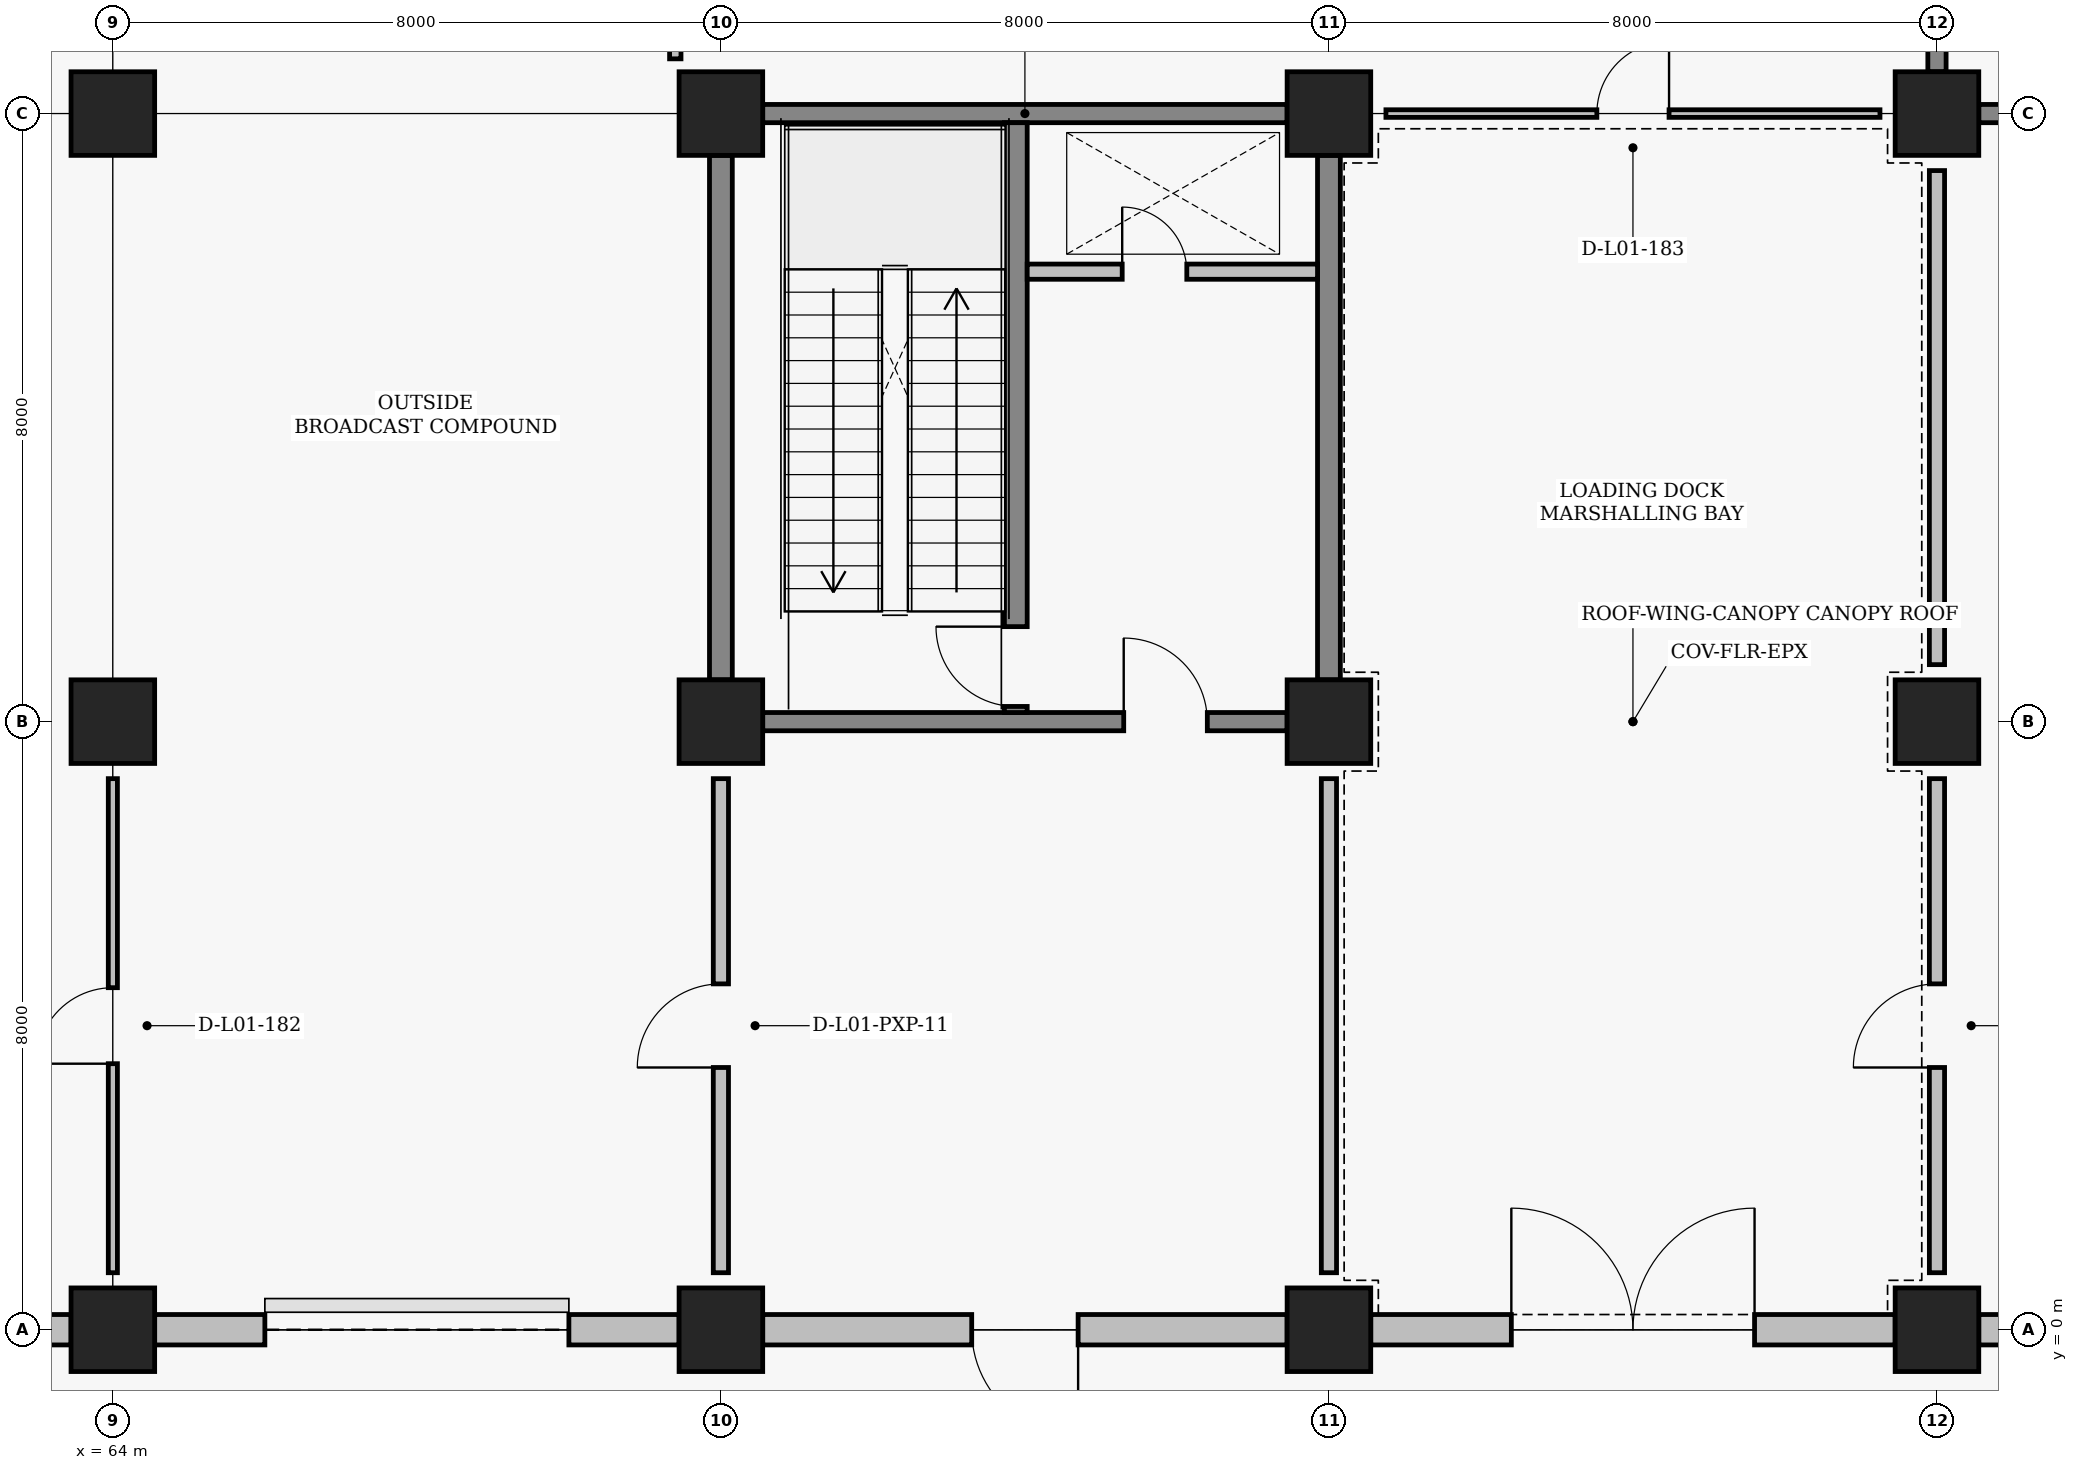
"""IFC4 building model, lengths in metres.
Left out: names, types, materials, properties, quantities, classifications, styles, units other than length and angle.
Written with IfcOpenShell. Run it as: python <this file> out.ifc"""

import sys

from ifc_helpers import new_model, si_unit, direction, frame, frame_2d, origin, origin_2d, place, context, subcontext, project, spatial, rectangle, extrude, element, fill, save


model = new_model("IFC4")
c1 = context("Model", 3, precision=1e-05, world=origin(), true_north=direction((0.0, 1.0)))
c2 = subcontext(c1, "Body", "Model", "MODEL_VIEW")
j1 = project(units=[si_unit("LENGTHUNIT", "METRE"), si_unit("PLANEANGLEUNIT", "RADIAN")], contexts=[c1])
p1 = place(None, origin())
s1 = spatial("IfcSite", under=j1, at=p1, CompositionType="ELEMENT")
p2 = place(p1, origin())
s2 = spatial("IfcBuilding", under=s1, at=p2, CompositionType="ELEMENT")
p3 = place(p2, origin())
s3 = spatial("IfcBuildingStorey", under=s2, at=p3, CompositionType="ELEMENT", Elevation=0.0)
for number, where, z_axis, x_axis in (
    (1, (64.0, 0.0, 0.0), (0.0, 0.0, 1.0), (1.0, 0.0, 0.0)),
    (2, (64.0, 8.0, 0.0), (0.0, 0.0, 1.0), (1.0, 0.0, 0.0)),
    (3, (64.0, 16.0, 0.0), (0.0, 0.0, 1.0), (1.0, 0.0, 0.0)),
    (4, (72.0, 0.0, 0.0), (0.0, 0.0, 1.0), (1.0, 0.0, 0.0)),
    (5, (72.0, 8.0, 0.0), (0.0, 0.0, 1.0), (1.0, 0.0, 0.0)),
    (6, (72.0, 16.0, 0.0), (0.0, 0.0, 1.0), (1.0, 0.0, 0.0)),
    (7, (80.0, 0.0, 0.0), (0.0, 0.0, 1.0), (1.0, 0.0, 0.0)),
    (8, (80.0, 8.0, 0.0), (0.0, 0.0, 1.0), (1.0, 0.0, 0.0)),
    (9, (80.0, 16.0, 0.0), (0.0, 0.0, 1.0), (1.0, 0.0, 0.0)),
    (10, (88.0, 0.0, 0.0), (0.0, 0.0, 1.0), (1.0, 0.0, 0.0)),
    (11, (88.0, 8.0, 0.0), (0.0, 0.0, 1.0), (1.0, 0.0, 0.0)),
    (12, (88.0, 16.0, 0.0), (0.0, 0.0, 1.0), (1.0, 0.0, 0.0)),
):
    element("IfcColumn", number, at=place(p3, frame(where, z_axis=z_axis, x_axis=x_axis)), inside=s3, PredefinedType="COLUMN", context=c2, shape_type="SweptSolid", body=[
        extrude(rectangle(XDim=1.1, YDim=1.1, at=origin_2d()), origin(), (0.0, 0.0, 1.0), 4.8),
    ])
p4 = place(p3, frame((56.55, 0.0, 0.0), z_axis=(0.0, 0.0, 1.0), x_axis=(1.0, 0.0, 0.0)))
e13 = element("IfcWall", 13, at=p4, inside=s3, PredefinedType="SOLIDWALL", context=c2, shape_type="SweptSolid", body=[
    extrude(rectangle(XDim=6.9, YDim=0.4, at=frame_2d((3.45, 0.0))), origin(), (0.0, 0.0, 1.0), 3.81),
])
p5 = place(p4, frame((2.05, 0.0, 0.0)))
e14 = element("IfcOpeningElement", 14, at=p5, cuts=e13, PredefinedType="OPENING", context=c2, shape_type="SweptSolid", body=[
    extrude(rectangle(XDim=2.8, YDim=2.55, at=frame_2d((1.4, 1.275))), frame((0.0, 0.21, 0.0), z_axis=(0.0, -1.0, 0.0), x_axis=(1.0, 0.0, 0.0)), (0.0, 0.0, 1.0), 0.42),
])
p6 = place(p3, frame((64.55, 0.0, 0.0), z_axis=(0.0, 0.0, 1.0), x_axis=(1.0, 0.0, 0.0)))
e15 = element("IfcWall", 15, at=p6, inside=s3, PredefinedType="SOLIDWALL", context=c2, shape_type="SweptSolid", body=[
    extrude(rectangle(XDim=6.9, YDim=0.4, at=frame_2d((3.45, 0.0))), origin(), (0.0, 0.0, 1.0), 3.81),
])
p7 = place(p6, frame((1.45, 0.0, 0.0)))
e16 = element("IfcOpeningElement", 16, at=p7, cuts=e15, PredefinedType="OPENING", context=c2, shape_type="SweptSolid", body=[
    extrude(rectangle(XDim=4.0, YDim=3.5, at=frame_2d((2.0, 1.75))), frame((0.0, 0.21, 0.0), z_axis=(0.0, -1.0, 0.0), x_axis=(1.0, 0.0, 0.0)), (0.0, 0.0, 1.0), 0.42),
])
p8 = place(p3, frame((79.45, 0.0, 0.0), z_axis=(0.0, 0.0, 1.0), x_axis=(-1.0, 0.0, 0.0)))
e17 = element("IfcWall", 17, at=p8, inside=s3, PredefinedType="SOLIDWALL", context=c2, shape_type="SweptSolid", body=[
    extrude(rectangle(XDim=6.9, YDim=0.4, at=frame_2d((3.45, 0.0))), origin(), (0.0, 0.0, 1.0), 3.81),
])
p9 = place(p8, frame((2.75, 0.0, 0.0)))
e18 = element("IfcOpeningElement", 18, at=p9, cuts=e17, PredefinedType="OPENING", context=c2, shape_type="SweptSolid", body=[
    extrude(rectangle(XDim=1.4, YDim=2.2, at=frame_2d((0.7, 1.1))), frame((0.0, 0.21, 0.0), z_axis=(0.0, -1.0, 0.0), x_axis=(1.0, 0.0, 0.0)), (0.0, 0.0, 1.0), 0.42),
])
p10 = place(p3, frame((80.55, 0.0, 0.0), z_axis=(0.0, 0.0, 1.0), x_axis=(1.0, 0.0, 0.0)))
e19 = element("IfcWall", 19, at=p10, inside=s3, PredefinedType="SOLIDWALL", context=c2, shape_type="SweptSolid", body=[
    extrude(rectangle(XDim=6.9, YDim=0.4, at=frame_2d((3.45, 0.0))), origin(), (0.0, 0.0, 1.0), 3.81),
])
p11 = place(p10, frame((1.85, 0.0, 0.0)))
e20 = element("IfcOpeningElement", 20, at=p11, cuts=e19, PredefinedType="OPENING", context=c2, shape_type="SweptSolid", body=[
    extrude(rectangle(XDim=3.2, YDim=2.7, at=frame_2d((1.6, 1.35))), frame((0.0, 0.21, 0.0), z_axis=(0.0, -1.0, 0.0), x_axis=(1.0, 0.0, 0.0)), (0.0, 0.0, 1.0), 0.42),
])
p12 = place(p3, frame((95.45, 0.0, 0.0), z_axis=(0.0, 0.0, 1.0), x_axis=(-1.0, 0.0, 0.0)))
e21 = element("IfcWall", 21, at=p12, inside=s3, PredefinedType="SOLIDWALL", context=c2, shape_type="SweptSolid", body=[
    extrude(rectangle(XDim=6.9, YDim=0.4, at=frame_2d((3.45, 0.0))), origin(), (0.0, 0.0, 1.0), 3.81),
])
p13 = place(p12, frame((2.75, 0.0, 0.0)))
e22 = element("IfcOpeningElement", 22, at=p13, cuts=e21, PredefinedType="OPENING", context=c2, shape_type="SweptSolid", body=[
    extrude(rectangle(XDim=1.4, YDim=2.2, at=frame_2d((0.7, 1.1))), frame((0.0, 0.21, 0.0), z_axis=(0.0, -1.0, 0.0), x_axis=(1.0, 0.0, 0.0)), (0.0, 0.0, 1.0), 0.42),
])
p14 = place(p3, frame((88.55, 16.0, 0.0), z_axis=(0.0, 0.0, 1.0), x_axis=(1.0, 0.0, 0.0)))
e23 = element("IfcWall", 23, at=p14, inside=s3, PredefinedType="SHEAR", context=c2, shape_type="SweptSolid", body=[
    extrude(rectangle(XDim=6.9, YDim=0.24, at=frame_2d((3.45, 0.0))), origin(), (0.0, 0.0, 1.0), 2.34),
])
p15 = place(p14, frame((4.75, 0.0, 0.0)))
e24 = element("IfcOpeningElement", 24, at=p15, cuts=e23, PredefinedType="OPENING", context=c2, shape_type="SweptSolid", body=[
    extrude(rectangle(XDim=1.1, YDim=2.2, at=frame_2d((0.55, 1.1))), frame((0.0, 0.13, 0.0), z_axis=(0.0, -1.0, 0.0), x_axis=(1.0, 0.0, 0.0)), (0.0, 0.0, 1.0), 0.26),
])
p16 = place(p3, frame((88.0, 16.55, 0.0), z_axis=(0.0, 0.0, 1.0), x_axis=(0.0, 1.0, 0.0)))
e25 = element("IfcWall", 25, at=p16, inside=s3, PredefinedType="SHEAR", context=c2, shape_type="SweptSolid", body=[
    extrude(rectangle(XDim=6.9, YDim=0.24, at=frame_2d((3.45, 0.0))), origin(), (0.0, 0.0, 1.0), 2.34),
])
p17 = place(p3, frame((72.55, 8.0, 0.0), z_axis=(0.0, 0.0, 1.0), x_axis=(1.0, 0.0, 0.0)))
e26 = element("IfcWall", 26, at=p17, inside=s3, PredefinedType="SHEAR", context=c2, shape_type="SweptSolid", body=[
    extrude(rectangle(XDim=6.9, YDim=0.24, at=frame_2d((3.45, 0.0))), origin(), (0.0, 0.0, 1.0), 3.81),
])
p18 = place(p17, frame((4.75, 0.0, 0.0)))
e27 = element("IfcOpeningElement", 27, at=p18, cuts=e26, PredefinedType="OPENING", context=c2, shape_type="SweptSolid", body=[
    extrude(rectangle(XDim=1.1, YDim=2.2, at=frame_2d((0.55, 1.1))), frame((0.0, 0.13, 0.0), z_axis=(0.0, -1.0, 0.0), x_axis=(1.0, 0.0, 0.0)), (0.0, 0.0, 1.0), 0.26),
])
p19 = place(p3, frame((72.55, 16.0, 0.0), z_axis=(0.0, 0.0, 1.0), x_axis=(1.0, 0.0, 0.0)))
e28 = element("IfcWall", 28, at=p19, inside=s3, PredefinedType="SHEAR", context=c2, shape_type="SweptSolid", body=[
    extrude(rectangle(XDim=6.9, YDim=0.24, at=frame_2d((3.45, 0.0))), origin(), (0.0, 0.0, 1.0), 2.34),
])
for number, where, z_axis, x_axis in (
    (29, (72.0, 8.55, 0.0), (0.0, 0.0, 1.0), (0.0, 1.0, 0.0)),
    (30, (80.0, 8.55, 0.0), (0.0, 0.0, 1.0), (0.0, 1.0, 0.0)),
):
    element("IfcWall", number, at=place(p3, frame(where, z_axis=z_axis, x_axis=x_axis)), inside=s3, PredefinedType="SHEAR", context=c2, shape_type="SweptSolid", body=[
        extrude(rectangle(XDim=6.9, YDim=0.3, at=frame_2d((3.45, 0.0))), origin(), (0.0, 0.0, 1.0), 2.34),
    ])
p20 = place(p3, frame((75.88, 8.12, 0.0), z_axis=(0.0, 0.0, 1.0), x_axis=(0.0, 1.0, 0.0)))
e31 = element("IfcWall", 31, at=p20, inside=s3, PredefinedType="SHEAR", context=c2, shape_type="SweptSolid", body=[
    extrude(rectangle(XDim=7.76, YDim=0.3, at=frame_2d((3.88, 0.0))), origin(), (0.0, 0.0, 1.0), 2.34),
])
p21 = place(p20, frame((0.08, 0.0, 0.0)))
e32 = element("IfcOpeningElement", 32, at=p21, cuts=e31, PredefinedType="OPENING", context=c2, shape_type="SweptSolid", body=[
    extrude(rectangle(XDim=1.05, YDim=2.15, at=frame_2d((0.525, 1.075))), frame((0.0, 0.16, 0.0), z_axis=(0.0, -1.0, 0.0), x_axis=(1.0, 0.0, 0.0)), (0.0, 0.0, 1.0), 0.32),
])
p22 = place(p3, frame((76.03, 13.92, 0.0), z_axis=(0.0, 0.0, 1.0), x_axis=(1.0, 0.0, 0.0)))
e33 = element("IfcWall", 33, at=p22, inside=s3, PredefinedType="PARTITIONING", context=c2, shape_type="SweptSolid", body=[
    extrude(rectangle(XDim=3.82, YDim=0.2, at=frame_2d((1.91, 0.0))), origin(), (0.0, 0.0, 1.0), 3.81),
])
p23 = place(p22, frame((1.25, 0.0, 0.0)))
e34 = element("IfcOpeningElement", 34, at=p23, cuts=e33, PredefinedType="OPENING", context=c2, shape_type="SweptSolid", body=[
    extrude(rectangle(XDim=0.85, YDim=2.05, at=frame_2d((0.425, 1.025))), frame((0.0, 0.11, 0.0), z_axis=(0.0, -1.0, 0.0), x_axis=(1.0, 0.0, 0.0)), (0.0, 0.0, 1.0), 0.22),
])
p24 = place(p3, frame((88.0, 0.75, 0.0), z_axis=(0.0, 0.0, 1.0), x_axis=(0.0, 1.0, 0.0)))
e35 = element("IfcWall", 35, at=p24, inside=s3, PredefinedType="PARTITIONING", context=c2, shape_type="SweptSolid", body=[
    extrude(rectangle(XDim=6.5, YDim=0.2, at=frame_2d((3.25, 0.0))), origin(), (0.0, 0.0, 1.0), 3.81),
])
p25 = place(p24, frame((2.7, 0.0, 0.0)))
e36 = element("IfcOpeningElement", 36, at=p25, cuts=e35, PredefinedType="OPENING", context=c2, shape_type="SweptSolid", body=[
    extrude(rectangle(XDim=1.1, YDim=2.2, at=frame_2d((0.55, 1.1))), frame((0.0, 0.11, 0.0), z_axis=(0.0, -1.0, 0.0), x_axis=(1.0, 0.0, 0.0)), (0.0, 0.0, 1.0), 0.22),
])
p26 = place(p3, frame((88.0, 8.75, 0.0), z_axis=(0.0, 0.0, 1.0), x_axis=(0.0, 1.0, 0.0)))
e37 = element("IfcWall", 37, at=p26, inside=s3, PredefinedType="PARTITIONING", context=c2, shape_type="SweptSolid", body=[
    extrude(rectangle(XDim=6.5, YDim=0.2, at=frame_2d((3.25, 0.0))), origin(), (0.0, 0.0, 1.0), 3.81),
])
p27 = place(p3, frame((72.0, 0.75, 0.0), z_axis=(0.0, 0.0, 1.0), x_axis=(0.0, 1.0, 0.0)))
e38 = element("IfcWall", 38, at=p27, inside=s3, PredefinedType="PARTITIONING", context=c2, shape_type="SweptSolid", body=[
    extrude(rectangle(XDim=6.5, YDim=0.2, at=frame_2d((3.25, 0.0))), origin(), (0.0, 0.0, 1.0), 3.81),
])
p28 = place(p27, frame((2.7, 0.0, 0.0)))
e39 = element("IfcOpeningElement", 39, at=p28, cuts=e38, PredefinedType="OPENING", context=c2, shape_type="SweptSolid", body=[
    extrude(rectangle(XDim=1.1, YDim=2.2, at=frame_2d((0.55, 1.1))), frame((0.0, 0.11, 0.0), z_axis=(0.0, -1.0, 0.0), x_axis=(1.0, 0.0, 0.0)), (0.0, 0.0, 1.0), 0.22),
])
p29 = place(p3, frame((80.0, 0.75, 0.0), z_axis=(0.0, 0.0, 1.0), x_axis=(0.0, 1.0, 0.0)))
e40 = element("IfcWall", 40, at=p29, inside=s3, PredefinedType="PARTITIONING", context=c2, shape_type="SweptSolid", body=[
    extrude(rectangle(XDim=6.5, YDim=0.2, at=frame_2d((3.25, 0.0))), origin(), (0.0, 0.0, 1.0), 3.81),
])
p30 = place(p3, frame((71.4, 16.72, 0.0), z_axis=(0.0, 0.0, 1.0), x_axis=(0.0, 1.0, 0.0)))
e41 = element("IfcWall", 41, at=p30, inside=s3, PredefinedType="PARTITIONING", context=c2, shape_type="SweptSolid", body=[
    extrude(rectangle(XDim=6.56, YDim=0.15, at=frame_2d((3.28, 0.0))), origin(), (0.0, 0.0, 1.0), 3.66),
])
p31 = place(p30, frame((1.3, 0.0, 0.0)))
e42 = element("IfcOpeningElement", 42, at=p31, cuts=e41, PredefinedType="OPENING", context=c2, shape_type="SweptSolid", body=[
    extrude(rectangle(XDim=0.9, YDim=2.1, at=frame_2d((0.45, 1.05))), frame((0.0, 0.085, 0.0), z_axis=(0.0, -1.0, 0.0), x_axis=(1.0, 0.0, 0.0)), (0.0, 0.0, 1.0), 0.17),
])
p32 = place(p30, frame((4.2, 0.0, 0.0)))
e43 = element("IfcOpeningElement", 43, at=p32, cuts=e41, PredefinedType="OPENING", context=c2, shape_type="SweptSolid", body=[
    extrude(rectangle(XDim=1.0, YDim=2.15, at=frame_2d((0.5, 1.075))), frame((0.0, 0.085, 0.0), z_axis=(0.0, -1.0, 0.0), x_axis=(1.0, 0.0, 0.0)), (0.0, 0.0, 1.0), 0.17),
])
p33 = place(p3, frame((64.0, 0.75, 0.0), z_axis=(0.0, 0.0, 1.0), x_axis=(0.0, 1.0, 0.0)))
e44 = element("IfcWall", 44, at=p33, inside=s3, PredefinedType="PARTITIONING", context=c2, shape_type="SweptSolid", body=[
    extrude(rectangle(XDim=6.5, YDim=0.12, at=frame_2d((3.25, 0.0))), origin(), (0.0, 0.0, 1.0), 3.81),
])
p34 = place(p33, frame((2.75, 0.0, 0.0)))
e45 = element("IfcOpeningElement", 45, at=p34, cuts=e44, PredefinedType="OPENING", context=c2, shape_type="SweptSolid", body=[
    extrude(rectangle(XDim=1.0, YDim=2.1, at=frame_2d((0.5, 1.05))), frame((0.0, 0.07, 0.0), z_axis=(0.0, -1.0, 0.0), x_axis=(1.0, 0.0, 0.0)), (0.0, 0.0, 1.0), 0.14),
])
p35 = place(p3, frame((80.75, 16.0, 0.0), z_axis=(0.0, 0.0, 1.0), x_axis=(1.0, 0.0, 0.0)))
e46 = element("IfcWall", 46, at=p35, inside=s3, PredefinedType="PARTITIONING", context=c2, shape_type="SweptSolid", body=[
    extrude(rectangle(XDim=6.5, YDim=0.1, at=frame_2d((3.25, 0.0))), origin(), (0.0, 0.0, 1.0), 2.34),
])
p36 = place(p35, frame((2.775, 0.0, 0.0)))
e47 = element("IfcOpeningElement", 47, at=p36, cuts=e46, PredefinedType="OPENING", context=c2, shape_type="SweptSolid", body=[
    extrude(rectangle(XDim=0.95, YDim=2.1, at=frame_2d((0.475, 1.05))), frame((0.0, 0.06, 0.0), z_axis=(0.0, -1.0, 0.0), x_axis=(1.0, 0.0, 0.0)), (0.0, 0.0, 1.0), 0.12),
])
p37 = place(p7, origin())
e48 = element("IfcDoor", 48, at=p37, inside=s3, OperationType="ROLLINGUP", PredefinedType="GATE", context=c2, shape_type="SweptSolid", body=[
    extrude(rectangle(XDim=4.0, YDim=3.5, at=frame_2d((2.0, 1.75))), frame((0.0, 0.025, 0.0), z_axis=(0.0, -1.0, 0.0), x_axis=(1.0, 0.0, 0.0)), (0.0, 0.0, 1.0), 0.05),
])
fill(e16, e48)
p38 = place(p9, origin())
e49 = element("IfcDoor", 49, at=p38, inside=s3, OperationType="SINGLE_SWING_LEFT", PredefinedType="DOOR", context=c2, shape_type="SweptSolid", body=[
    extrude(rectangle(XDim=1.4, YDim=2.2, at=frame_2d((0.7, 1.1))), frame((0.0, 0.025, 0.0), z_axis=(0.0, -1.0, 0.0), x_axis=(1.0, 0.0, 0.0)), (0.0, 0.0, 1.0), 0.05),
])
fill(e18, e49)
p39 = place(p11, origin())
e50 = element("IfcDoor", 50, at=p39, inside=s3, OperationType="DOUBLE_SWING_LEFT", PredefinedType="DOOR", context=c2, shape_type="SweptSolid", body=[
    extrude(rectangle(XDim=3.2, YDim=2.7, at=frame_2d((1.6, 1.35))), frame((0.0, 0.025, 0.0), z_axis=(0.0, -1.0, 0.0), x_axis=(1.0, 0.0, 0.0)), (0.0, 0.0, 1.0), 0.05),
])
fill(e20, e50)
p40 = place(p18, origin())
e51 = element("IfcDoor", 51, at=p40, inside=s3, OperationType="SINGLE_SWING_LEFT", PredefinedType="DOOR", context=c2, shape_type="SweptSolid", body=[
    extrude(rectangle(XDim=1.1, YDim=2.2, at=frame_2d((0.55, 1.1))), frame((0.0, 0.025, 0.0), z_axis=(0.0, -1.0, 0.0), x_axis=(1.0, 0.0, 0.0)), (0.0, 0.0, 1.0), 0.05),
])
fill(e27, e51)
p41 = place(p21, origin())
e52 = element("IfcDoor", 52, at=p41, inside=s3, OperationType="SINGLE_SWING_RIGHT", PredefinedType="DOOR", context=c2, shape_type="SweptSolid", body=[
    extrude(rectangle(XDim=1.05, YDim=2.15, at=frame_2d((0.525, 1.075))), frame((0.0, 0.025, 0.0), z_axis=(0.0, -1.0, 0.0), x_axis=(1.0, 0.0, 0.0)), (0.0, 0.0, 1.0), 0.05),
])
fill(e32, e52)
p42 = place(p23, origin())
e53 = element("IfcDoor", 53, at=p42, inside=s3, OperationType="SINGLE_SWING_LEFT", PredefinedType="TRAPDOOR", context=c2, shape_type="SweptSolid", body=[
    extrude(rectangle(XDim=0.85, YDim=2.05, at=frame_2d((0.425, 1.025))), frame((0.0, 0.025, 0.0), z_axis=(0.0, -1.0, 0.0), x_axis=(1.0, 0.0, 0.0)), (0.0, 0.0, 1.0), 0.05),
])
fill(e34, e53)
p43 = place(p25, origin())
e54 = element("IfcDoor", 54, at=p43, inside=s3, OperationType="SINGLE_SWING_LEFT", PredefinedType="DOOR", context=c2, shape_type="SweptSolid", body=[
    extrude(rectangle(XDim=1.1, YDim=2.2, at=frame_2d((0.55, 1.1))), frame((0.0, 0.025, 0.0), z_axis=(0.0, -1.0, 0.0), x_axis=(1.0, 0.0, 0.0)), (0.0, 0.0, 1.0), 0.05),
])
fill(e36, e54)
p44 = place(p28, origin())
e55 = element("IfcDoor", 55, at=p44, inside=s3, OperationType="SINGLE_SWING_LEFT", PredefinedType="DOOR", context=c2, shape_type="SweptSolid", body=[
    extrude(rectangle(XDim=1.1, YDim=2.2, at=frame_2d((0.55, 1.1))), frame((0.0, 0.025, 0.0), z_axis=(0.0, -1.0, 0.0), x_axis=(1.0, 0.0, 0.0)), (0.0, 0.0, 1.0), 0.05),
])
fill(e39, e55)
p45 = place(p34, origin())
e56 = element("IfcDoor", 56, at=p45, inside=s3, OperationType="SINGLE_SWING_LEFT", PredefinedType="DOOR", context=c2, shape_type="SweptSolid", body=[
    extrude(rectangle(XDim=1.0, YDim=2.1, at=frame_2d((0.5, 1.05))), frame((0.0, 0.025, 0.0), z_axis=(0.0, -1.0, 0.0), x_axis=(1.0, 0.0, 0.0)), (0.0, 0.0, 1.0), 0.05),
])
fill(e45, e56)
p46 = place(p36, origin())
e57 = element("IfcDoor", 57, at=p46, inside=s3, OperationType="SINGLE_SWING_RIGHT", PredefinedType="DOOR", context=c2, shape_type="SweptSolid", body=[
    extrude(rectangle(XDim=0.95, YDim=2.1, at=frame_2d((0.475, 1.05))), frame((0.0, 0.025, 0.0), z_axis=(0.0, -1.0, 0.0), x_axis=(1.0, 0.0, 0.0)), (0.0, 0.0, 1.0), 0.05),
])
fill(e47, e57)
save(model, sys.argv[1])
